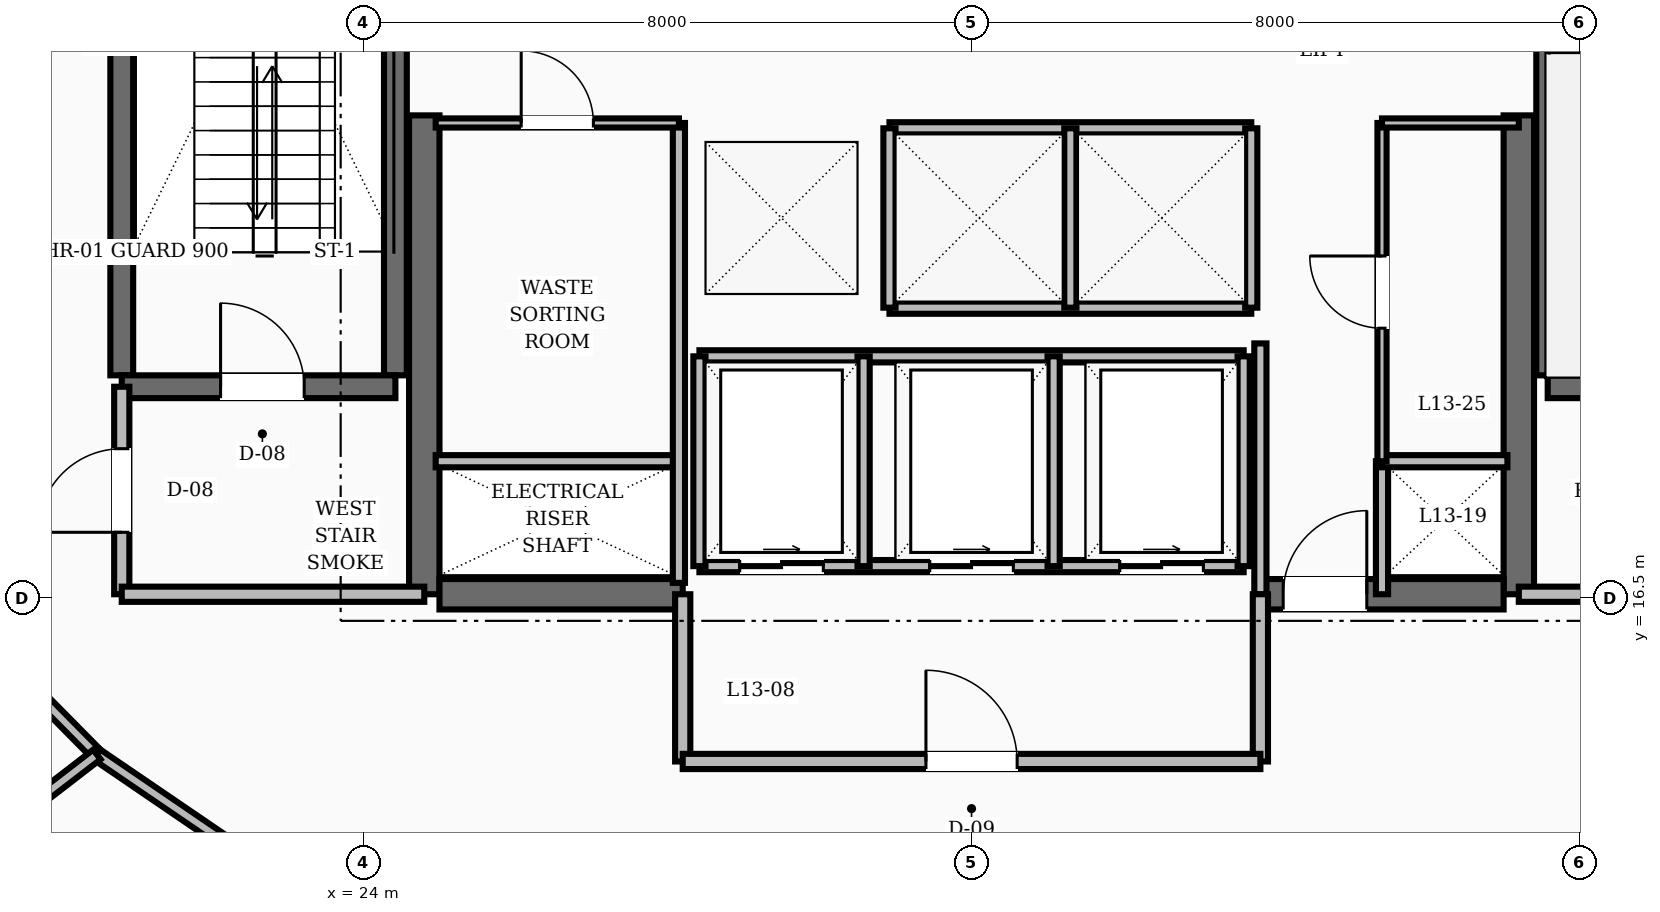
"""IFC4 building model, lengths in metres.
Left out: names, types, materials, properties, quantities, classifications, styles, units other than length and angle.
Written with IfcOpenShell. Run it as: python <this file> out.ifc"""

import sys

from ifc_helpers import new_model, si_unit, direction, frame, frame_2d, origin, place, context, subcontext, project, spatial, rectangle, extrude, element, fill, save


model = new_model("IFC4")
c1 = context("Model", 3, precision=1e-05, world=origin(), true_north=direction((0.0, 1.0)))
c2 = subcontext(c1, "Body", "Model", "MODEL_VIEW")
j1 = project(units=[si_unit("LENGTHUNIT", "METRE"), si_unit("PLANEANGLEUNIT", "RADIAN")], contexts=[c1])
p1 = place(None, origin())
s1 = spatial("IfcSite", under=j1, at=p1, CompositionType="ELEMENT")
p2 = place(p1, origin())
s2 = spatial("IfcBuilding", under=s1, at=p2, CompositionType="ELEMENT")
p3 = place(p2, frame((0.0, 0.0, 55.6)))
s3 = spatial("IfcBuildingStorey", under=s2, at=p3, CompositionType="ELEMENT", Elevation=55.6)
for number, where, z_axis, x_axis in (
    (1, (24.8, 16.55, 0.0), (0.0, 0.0, 1.0), (0.0, 1.0, 0.0)),
    (2, (39.2, 16.55, 0.0), (0.0, 0.0, 1.0), (0.0, 1.0, 0.0)),
):
    element("IfcWall", number, at=place(p3, frame(where, z_axis=z_axis, x_axis=x_axis)), inside=s3, PredefinedType="SHEAR", context=c2, shape_type="SweptSolid", body=[
        extrude(rectangle(XDim=6.3, YDim=0.4, at=frame_2d((3.15, 0.0))), origin(), (0.0, 0.0, 1.0), 3.6),
    ])
p4 = place(p3, frame((25.0, 16.55, 0.0), z_axis=(0.0, 0.0, 1.0), x_axis=(1.0, 0.0, 0.0)))
e3 = element("IfcWall", 3, at=p4, inside=s3, PredefinedType="SHEAR", context=c2, shape_type="SweptSolid", body=[
    extrude(rectangle(XDim=3.2, YDim=0.4, at=frame_2d((1.6, 0.0))), origin(), (0.0, 0.0, 1.0), 3.6),
])
p5 = place(p3, frame((35.8, 16.55, 0.0), z_axis=(0.0, 0.0, 1.0), x_axis=(1.0, 0.0, 0.0)))
e4 = element("IfcWall", 4, at=p5, inside=s3, PredefinedType="SHEAR", context=c2, shape_type="SweptSolid", body=[
    extrude(rectangle(XDim=3.2, YDim=0.4, at=frame_2d((1.6, 0.0))), origin(), (0.0, 0.0, 1.0), 3.6),
])
p6 = place(p5, frame((0.3, 0.0, 0.0)))
e5 = element("IfcOpeningElement", 5, at=p6, cuts=e4, PredefinedType="OPENING", context=c2, shape_type="SweptSolid", body=[
    extrude(rectangle(XDim=1.1, YDim=2.1, at=frame_2d((0.55, 1.05))), frame((0.0, 0.21, 0.0), z_axis=(0.0, -1.0, 0.0), x_axis=(1.0, 0.0, 0.0)), (0.0, 0.0, 1.0), 0.42),
])
for number, where, z_axis, x_axis in (
    (6, (20.82, 19.43, 0.0), (0.0, 0.0, 1.0), (0.0, 1.0, 0.0)),
    (7, (24.42, 19.43, 0.0), (0.0, 0.0, 1.0), (0.0, 1.0, 0.0)),
):
    element("IfcWall", number, at=place(p3, frame(where, z_axis=z_axis, x_axis=x_axis)), inside=s3, PredefinedType="SHEAR", context=c2, shape_type="SweptSolid", body=[
        extrude(rectangle(XDim=8.74, YDim=0.3, at=frame_2d((4.37, 0.0))), origin(), (0.0, 0.0, 1.0), 3.6),
    ])
p7 = place(p3, frame((20.82, 19.28, 0.0), z_axis=(0.0, 0.0, 1.0), x_axis=(1.0, 0.0, 0.0)))
e8 = element("IfcWall", 8, at=p7, inside=s3, PredefinedType="SHEAR", context=c2, shape_type="SweptSolid", body=[
    extrude(rectangle(XDim=3.6, YDim=0.3, at=frame_2d((1.8, 0.0))), origin(), (0.0, 0.0, 1.0), 3.6),
])
p8 = place(p7, frame((1.3, 0.0, 0.0)))
e9 = element("IfcOpeningElement", 9, at=p8, cuts=e8, PredefinedType="OPENING", context=c2, shape_type="SweptSolid", body=[
    extrude(rectangle(XDim=1.1, YDim=2.1, at=frame_2d((0.55, 1.05))), frame((0.0, 0.16, 0.0), z_axis=(0.0, -1.0, 0.0), x_axis=(1.0, 0.0, 0.0)), (0.0, 0.0, 1.0), 0.32),
])
p9 = place(p3, frame((39.58, 19.43, 0.0), z_axis=(0.0, 0.0, 1.0), x_axis=(0.0, 1.0, 0.0)))
e10 = element("IfcWall", 10, at=p9, inside=s3, PredefinedType="SHEAR", context=c2, shape_type="SweptSolid", body=[
    extrude(rectangle(XDim=8.74, YDim=0.3, at=frame_2d((4.37, 0.0))), origin(), (0.0, 0.0, 1.0), 3.6),
])
p10 = place(p3, frame((39.58, 19.28, 0.0), z_axis=(0.0, 0.0, 1.0), x_axis=(1.0, 0.0, 0.0)))
e11 = element("IfcWall", 11, at=p10, inside=s3, PredefinedType="SHEAR", context=c2, shape_type="SweptSolid", body=[
    extrude(rectangle(XDim=3.6, YDim=0.3, at=frame_2d((1.8, 0.0))), origin(), (0.0, 0.0, 1.0), 3.6),
])
p11 = place(p3, frame((20.82, 16.55, 0.0), z_axis=(0.0, 0.0, 1.0), x_axis=(0.0, 1.0, 0.0)))
e12 = element("IfcWall", 12, at=p11, inside=s3, PredefinedType="SOLIDWALL", context=c2, shape_type="SweptSolid", body=[
    extrude(rectangle(XDim=2.73, YDim=0.2, at=frame_2d((1.365, 0.0))), origin(), (0.0, 0.0, 1.0), 2.61),
])
p12 = place(p11, frame((0.815, 0.0, 0.0)))
e13 = element("IfcOpeningElement", 13, at=p12, cuts=e12, PredefinedType="OPENING", context=c2, shape_type="SweptSolid", body=[
    extrude(rectangle(XDim=1.1, YDim=2.1, at=frame_2d((0.55, 1.05))), frame((0.0, 0.11, 0.0), z_axis=(0.0, -1.0, 0.0), x_axis=(1.0, 0.0, 0.0)), (0.0, 0.0, 1.0), 0.22),
])
for number, where, z_axis, x_axis in (
    (14, (20.82, 16.55, 0.0), (0.0, 0.0, 1.0), (1.0, 0.0, 0.0)),
    (15, (39.2, 16.55, 0.0), (0.0, 0.0, 1.0), (1.0, 0.0, 0.0)),
):
    element("IfcWall", number, at=place(p3, frame(where, z_axis=z_axis, x_axis=x_axis)), inside=s3, PredefinedType="SOLIDWALL", context=c2, shape_type="SweptSolid", body=[
        extrude(rectangle(XDim=3.98, YDim=0.2, at=frame_2d((1.99, 0.0))), origin(), (0.0, 0.0, 1.0), 2.61),
    ])
p13 = place(p3, frame((35.8, 16.55, 0.0), z_axis=(0.0, 0.0, 1.0), x_axis=(0.0, 1.0, 0.0)))
e16 = element("IfcWall", 16, at=p13, inside=s3, PredefinedType="SOLIDWALL", context=c2, shape_type="SweptSolid", body=[
    extrude(rectangle(XDim=3.3, YDim=0.16, at=frame_2d((1.65, 0.0))), origin(), (0.0, 0.0, 1.0), 2.61),
])
p14 = place(p3, frame((37.4, 16.55, 0.0), z_axis=(0.0, 0.0, 1.0), x_axis=(0.0, 1.0, 0.0)))
e17 = element("IfcWall", 17, at=p14, inside=s3, PredefinedType="SOLIDWALL", context=c2, shape_type="SweptSolid", body=[
    extrude(rectangle(XDim=1.75, YDim=0.16, at=frame_2d((0.875, 0.0))), origin(), (0.0, 0.0, 1.0), 2.61),
])
for number, where, z_axis, x_axis in (
    (18, (28.2, 14.35, 0.0), (0.0, 0.0, 1.0), (0.0, 1.0, 0.0)),
    (19, (35.8, 14.35, 0.0), (0.0, 0.0, 1.0), (0.0, 1.0, 0.0)),
):
    element("IfcWall", number, at=place(p3, frame(where, z_axis=z_axis, x_axis=x_axis)), inside=s3, PredefinedType="SOLIDWALL", context=c2, shape_type="SweptSolid", body=[
        extrude(rectangle(XDim=2.2, YDim=0.2, at=frame_2d((1.1, 0.0))), origin(), (0.0, 0.0, 1.0), 2.61),
    ])
p15 = place(p3, frame((28.2, 14.35, 0.0), z_axis=(0.0, 0.0, 1.0), x_axis=(1.0, 0.0, 0.0)))
e20 = element("IfcWall", 20, at=p15, inside=s3, PredefinedType="SOLIDWALL", context=c2, shape_type="SweptSolid", body=[
    extrude(rectangle(XDim=7.6, YDim=0.2, at=frame_2d((3.8, 0.0))), origin(), (0.0, 0.0, 1.0), 2.61),
])
p16 = place(p15, frame((3.2, 0.0, 0.0)))
e21 = element("IfcOpeningElement", 21, at=p16, cuts=e20, PredefinedType="OPENING", context=c2, shape_type="SweptSolid", body=[
    extrude(rectangle(XDim=1.2, YDim=2.1, at=frame_2d((0.6, 1.05))), frame((0.0, 0.11, 0.0), z_axis=(0.0, -1.0, 0.0), x_axis=(1.0, 0.0, 0.0)), (0.0, 0.0, 1.0), 0.22),
])
for number, where, z_axis, x_axis in (
    (22, (30.92, 22.68, 0.0), (0.0, 0.0, 1.0), (1.0, 0.0, 0.0)),
    (23, (30.92, 20.32, 0.0), (0.0, 0.0, 1.0), (1.0, 0.0, 0.0)),
):
    element("IfcWall", number, at=place(p3, frame(where, z_axis=z_axis, x_axis=x_axis)), inside=s3, PredefinedType="SOLIDWALL", context=c2, shape_type="SweptSolid", body=[
        extrude(rectangle(XDim=4.76, YDim=0.16, at=frame_2d((2.38, 0.0))), origin(), (0.0, 0.0, 1.0), 2.61),
    ])
for number, where, z_axis, x_axis in (
    (24, (30.92, 20.32, 0.0), (0.0, 0.0, 1.0), (0.0, 1.0, 0.0)),
    (25, (33.3, 20.32, 0.0), (0.0, 0.0, 1.0), (0.0, 1.0, 0.0)),
    (26, (35.68, 20.32, 0.0), (0.0, 0.0, 1.0), (0.0, 1.0, 0.0)),
):
    element("IfcWall", number, at=place(p3, frame(where, z_axis=z_axis, x_axis=x_axis)), inside=s3, PredefinedType="SOLIDWALL", context=c2, shape_type="SweptSolid", body=[
        extrude(rectangle(XDim=2.36, YDim=0.16, at=frame_2d((1.18, 0.0))), origin(), (0.0, 0.0, 1.0), 2.61),
    ])
p17 = place(p3, frame((28.42, 16.92, 0.0), z_axis=(0.0, 0.0, 1.0), x_axis=(1.0, 0.0, 0.0)))
e27 = element("IfcWall", 27, at=p17, inside=s3, PredefinedType="SOLIDWALL", context=c2, shape_type="SweptSolid", body=[
    extrude(rectangle(XDim=7.16, YDim=0.16, at=frame_2d((3.58, 0.0))), origin(), (0.0, 0.0, 1.0), 2.61),
])
p18 = place(p17, frame((0.53, 0.0, 0.0)))
e28 = element("IfcOpeningElement", 28, at=p18, cuts=e27, PredefinedType="OPENING", context=c2, shape_type="SweptSolid", body=[
    extrude(rectangle(XDim=1.1, YDim=2.15, at=frame_2d((0.55, 1.075))), frame((0.0, 0.09, 0.0), z_axis=(0.0, -1.0, 0.0), x_axis=(1.0, 0.0, 0.0)), (0.0, 0.0, 1.0), 0.18),
])
p19 = place(p17, frame((3.03, 0.0, 0.0)))
e29 = element("IfcOpeningElement", 29, at=p19, cuts=e27, PredefinedType="OPENING", context=c2, shape_type="SweptSolid", body=[
    extrude(rectangle(XDim=1.1, YDim=2.15, at=frame_2d((0.55, 1.075))), frame((0.0, 0.09, 0.0), z_axis=(0.0, -1.0, 0.0), x_axis=(1.0, 0.0, 0.0)), (0.0, 0.0, 1.0), 0.18),
])
p20 = place(p17, frame((5.53, 0.0, 0.0)))
e30 = element("IfcOpeningElement", 30, at=p20, cuts=e27, PredefinedType="OPENING", context=c2, shape_type="SweptSolid", body=[
    extrude(rectangle(XDim=1.1, YDim=2.15, at=frame_2d((0.55, 1.075))), frame((0.0, 0.09, 0.0), z_axis=(0.0, -1.0, 0.0), x_axis=(1.0, 0.0, 0.0)), (0.0, 0.0, 1.0), 0.18),
])
p21 = place(p3, frame((28.42, 19.68, 0.0), z_axis=(0.0, 0.0, 1.0), x_axis=(1.0, 0.0, 0.0)))
e31 = element("IfcWall", 31, at=p21, inside=s3, PredefinedType="SOLIDWALL", context=c2, shape_type="SweptSolid", body=[
    extrude(rectangle(XDim=7.16, YDim=0.16, at=frame_2d((3.58, 0.0))), origin(), (0.0, 0.0, 1.0), 2.61),
])
for number, where, z_axis, x_axis in (
    (32, (28.42, 16.92, 0.0), (0.0, 0.0, 1.0), (0.0, 1.0, 0.0)),
    (33, (30.58, 16.92, 0.0), (0.0, 0.0, 1.0), (0.0, 1.0, 0.0)),
    (34, (33.08, 16.92, 0.0), (0.0, 0.0, 1.0), (0.0, 1.0, 0.0)),
    (35, (35.58, 16.92, 0.0), (0.0, 0.0, 1.0), (0.0, 1.0, 0.0)),
):
    element("IfcWall", number, at=place(p3, frame(where, z_axis=z_axis, x_axis=x_axis)), inside=s3, PredefinedType="SOLIDWALL", context=c2, shape_type="SweptSolid", body=[
        extrude(rectangle(XDim=2.76, YDim=0.16, at=frame_2d((1.38, 0.0))), origin(), (0.0, 0.0, 1.0), 2.61),
    ])
p22 = place(p3, frame((24.95, 18.3, 0.0), z_axis=(0.0, 0.0, 1.0), x_axis=(1.0, 0.0, 0.0)))
e36 = element("IfcWall", 36, at=p22, inside=s3, PredefinedType="SOLIDWALL", context=c2, shape_type="SweptSolid", body=[
    extrude(rectangle(XDim=3.2, YDim=0.16, at=frame_2d((1.6, 0.0))), origin(), (0.0, 0.0, 1.0), 2.61),
])
p23 = place(p3, frame((28.15, 16.7, 0.0), z_axis=(0.0, 0.0, 1.0), x_axis=(0.0, 1.0, 0.0)))
e37 = element("IfcWall", 37, at=p23, inside=s3, PredefinedType="SOLIDWALL", context=c2, shape_type="SweptSolid", body=[
    extrude(rectangle(XDim=6.05, YDim=0.16, at=frame_2d((3.025, 0.0))), origin(), (0.0, 0.0, 1.0), 2.61),
])
p24 = place(p3, frame((37.4, 18.3, 0.0), z_axis=(0.0, 0.0, 1.0), x_axis=(1.0, 0.0, 0.0)))
e38 = element("IfcWall", 38, at=p24, inside=s3, PredefinedType="SOLIDWALL", context=c2, shape_type="SweptSolid", body=[
    extrude(rectangle(XDim=1.65, YDim=0.16, at=frame_2d((0.825, 0.0))), origin(), (0.0, 0.0, 1.0), 2.61),
])
p25 = place(p3, frame((24.95, 22.75, 0.0), z_axis=(0.0, 0.0, 1.0), x_axis=(1.0, 0.0, 0.0)))
e39 = element("IfcWall", 39, at=p25, inside=s3, PredefinedType="PARTITIONING", context=c2, shape_type="SweptSolid", body=[
    extrude(rectangle(XDim=3.2, YDim=0.12, at=frame_2d((1.6, 0.0))), origin(), (0.0, 0.0, 1.0), 2.61),
])
p26 = place(p25, frame((1.125, 0.0, 0.0)))
e40 = element("IfcOpeningElement", 40, at=p26, cuts=e39, PredefinedType="OPENING", context=c2, shape_type="SweptSolid", body=[
    extrude(rectangle(XDim=0.95, YDim=2.1, at=frame_2d((0.475, 1.05))), frame((0.0, 0.07, 0.0), z_axis=(0.0, -1.0, 0.0), x_axis=(1.0, 0.0, 0.0)), (0.0, 0.0, 1.0), 0.14),
])
p27 = place(p3, frame((37.4, 18.3, 0.0), z_axis=(0.0, 0.0, 1.0), x_axis=(0.0, 1.0, 0.0)))
e41 = element("IfcWall", 41, at=p27, inside=s3, PredefinedType="PARTITIONING", context=c2, shape_type="SweptSolid", body=[
    extrude(rectangle(XDim=4.45, YDim=0.12, at=frame_2d((2.225, 0.0))), origin(), (0.0, 0.0, 1.0), 2.61),
])
p28 = place(p27, frame((1.75, 0.0, 0.0)))
e42 = element("IfcOpeningElement", 42, at=p28, cuts=e41, PredefinedType="OPENING", context=c2, shape_type="SweptSolid", body=[
    extrude(rectangle(XDim=0.95, YDim=2.1, at=frame_2d((0.475, 1.05))), frame((0.0, 0.07, 0.0), z_axis=(0.0, -1.0, 0.0), x_axis=(1.0, 0.0, 0.0)), (0.0, 0.0, 1.0), 0.14),
])
p29 = place(p3, frame((37.4, 22.75, 0.0), z_axis=(0.0, 0.0, 1.0), x_axis=(1.0, 0.0, 0.0)))
e43 = element("IfcWall", 43, at=p29, inside=s3, PredefinedType="PARTITIONING", context=c2, shape_type="SweptSolid", body=[
    extrude(rectangle(XDim=1.8, YDim=0.12, at=frame_2d((0.9, 0.0))), origin(), (0.0, 0.0, 1.0), 2.61),
])
p30 = place(p3, frame((18.469, 16.49, 0.0), z_axis=(0.0, 0.0, 1.0), x_axis=(0.702811997, -0.711375636969, 0.0)))
e44 = element("IfcWall", 44, at=p30, inside=s3, PredefinedType="SOLIDWALL", context=c2, shape_type="SweptSolid", body=[
    extrude(rectangle(XDim=2.879, YDim=0.16, at=frame_2d((1.44, 0.0))), origin(), (0.0, 0.0, 1.0), 2.61),
])
p31 = place(p3, frame((20.492, 14.441, 0.0), z_axis=(0.0, 0.0, 1.0), x_axis=(0.826293096206, -0.56324037423, 0.0)))
e45 = element("IfcWall", 45, at=p31, inside=s3, PredefinedType="SOLIDWALL", context=c2, shape_type="SweptSolid", body=[
    extrude(rectangle(XDim=2.985, YDim=0.16, at=frame_2d((1.492, 0.0))), origin(), (0.0, 0.0, 1.0), 2.61),
])
p32 = place(p3, frame((20.492, 14.441, 0.0), z_axis=(0.0, 0.0, 1.0), x_axis=(-0.792237430117, -0.610212958173, 0.0)))
e46 = element("IfcWall", 46, at=p32, inside=s3, PredefinedType="SOLIDWALL", context=c2, shape_type="SweptSolid", body=[
    extrude(rectangle(XDim=8.667, YDim=0.16, at=frame_2d((4.333, 0.0))), origin(), (0.0, 0.0, 1.0), 2.61),
])
p33 = place(p8, origin())
e47 = element("IfcDoor", 47, at=p33, inside=s3, OperationType="SINGLE_SWING_LEFT", PredefinedType="DOOR", context=c2, shape_type="SweptSolid", body=[
    extrude(rectangle(XDim=1.1, YDim=2.1, at=frame_2d((0.55, 1.05))), frame((0.0, 0.025, 0.0), z_axis=(0.0, -1.0, 0.0), x_axis=(1.0, 0.0, 0.0)), (0.0, 0.0, 1.0), 0.05),
])
fill(e9, e47)
p34 = place(p12, origin())
e48 = element("IfcDoor", 48, at=p34, inside=s3, OperationType="SINGLE_SWING_LEFT", PredefinedType="DOOR", context=c2, shape_type="SweptSolid", body=[
    extrude(rectangle(XDim=1.1, YDim=2.1, at=frame_2d((0.55, 1.05))), frame((0.0, 0.025, 0.0), z_axis=(0.0, -1.0, 0.0), x_axis=(1.0, 0.0, 0.0)), (0.0, 0.0, 1.0), 0.05),
])
fill(e13, e48)
p35 = place(p6, origin())
e49 = element("IfcDoor", 49, at=p35, inside=s3, OperationType="SINGLE_SWING_RIGHT", PredefinedType="DOOR", context=c2, shape_type="SweptSolid", body=[
    extrude(rectangle(XDim=1.1, YDim=2.1, at=frame_2d((0.55, 1.05))), frame((0.0, 0.025, 0.0), z_axis=(0.0, -1.0, 0.0), x_axis=(1.0, 0.0, 0.0)), (0.0, 0.0, 1.0), 0.05),
])
fill(e5, e49)
p36 = place(p16, origin())
e50 = element("IfcDoor", 50, at=p36, inside=s3, OperationType="SINGLE_SWING_LEFT", PredefinedType="DOOR", context=c2, shape_type="SweptSolid", body=[
    extrude(rectangle(XDim=1.2, YDim=2.1, at=frame_2d((0.6, 1.05))), frame((0.0, 0.025, 0.0), z_axis=(0.0, -1.0, 0.0), x_axis=(1.0, 0.0, 0.0)), (0.0, 0.0, 1.0), 0.05),
])
fill(e21, e50)
p37 = place(p18, origin())
e51 = element("IfcDoor", 51, at=p37, inside=s3, OperationType="SLIDING_TO_RIGHT", PredefinedType="DOOR", context=c2, shape_type="SweptSolid", body=[
    extrude(rectangle(XDim=1.1, YDim=2.15, at=frame_2d((0.55, 1.075))), frame((0.0, 0.025, 0.0), z_axis=(0.0, -1.0, 0.0), x_axis=(1.0, 0.0, 0.0)), (0.0, 0.0, 1.0), 0.05),
])
fill(e28, e51)
p38 = place(p19, origin())
e52 = element("IfcDoor", 52, at=p38, inside=s3, OperationType="SLIDING_TO_RIGHT", PredefinedType="DOOR", context=c2, shape_type="SweptSolid", body=[
    extrude(rectangle(XDim=1.1, YDim=2.15, at=frame_2d((0.55, 1.075))), frame((0.0, 0.025, 0.0), z_axis=(0.0, -1.0, 0.0), x_axis=(1.0, 0.0, 0.0)), (0.0, 0.0, 1.0), 0.05),
])
fill(e29, e52)
p39 = place(p20, origin())
e53 = element("IfcDoor", 53, at=p39, inside=s3, OperationType="SLIDING_TO_RIGHT", PredefinedType="DOOR", context=c2, shape_type="SweptSolid", body=[
    extrude(rectangle(XDim=1.1, YDim=2.15, at=frame_2d((0.55, 1.075))), frame((0.0, 0.025, 0.0), z_axis=(0.0, -1.0, 0.0), x_axis=(1.0, 0.0, 0.0)), (0.0, 0.0, 1.0), 0.05),
])
fill(e30, e53)
p40 = place(p26, origin())
e54 = element("IfcDoor", 54, at=p40, inside=s3, OperationType="SINGLE_SWING_LEFT", PredefinedType="DOOR", context=c2, shape_type="SweptSolid", body=[
    extrude(rectangle(XDim=0.95, YDim=2.1, at=frame_2d((0.475, 1.05))), frame((0.0, 0.025, 0.0), z_axis=(0.0, -1.0, 0.0), x_axis=(1.0, 0.0, 0.0)), (0.0, 0.0, 1.0), 0.05),
])
fill(e40, e54)
p41 = place(p28, origin())
e55 = element("IfcDoor", 55, at=p41, inside=s3, OperationType="SINGLE_SWING_RIGHT", PredefinedType="DOOR", context=c2, shape_type="SweptSolid", body=[
    extrude(rectangle(XDim=0.95, YDim=2.1, at=frame_2d((0.475, 1.05))), frame((0.0, 0.025, 0.0), z_axis=(0.0, -1.0, 0.0), x_axis=(1.0, 0.0, 0.0)), (0.0, 0.0, 1.0), 0.05),
])
fill(e42, e55)
save(model, sys.argv[1])
